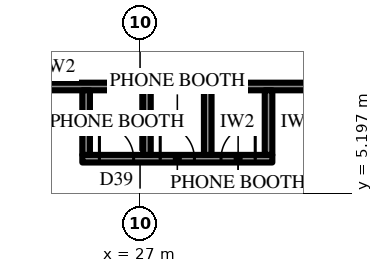
"""IFC4 building model, lengths in metres.
Left out: names, types, materials, properties, quantities, classifications, styles, units other than length and angle.
Written with IfcOpenShell. Run it as: python <this file> out.ifc"""

import sys

from ifc_helpers import new_model, si_unit, direction, frame, frame_2d, origin, place, context, subcontext, project, spatial, rectangle, extrude, element, fill, save


model = new_model("IFC4")
c1 = context("Model", 3, precision=1e-05, world=origin(), true_north=direction((0.0, 1.0)))
c2 = subcontext(c1, "Body", "Model", "MODEL_VIEW")
j1 = project(units=[si_unit("LENGTHUNIT", "METRE"), si_unit("PLANEANGLEUNIT", "RADIAN")], contexts=[c1])
p1 = place(None, origin())
s1 = spatial("IfcSite", under=j1, at=p1, CompositionType="ELEMENT")
p2 = place(p1, origin())
s2 = spatial("IfcBuilding", under=s1, at=p2, CompositionType="ELEMENT")
p3 = place(p2, frame((0.0, 0.0, 90.7)))
s3 = spatial("IfcBuildingStorey", under=s2, at=p3, CompositionType="ELEMENT", Elevation=90.7)
p4 = place(p3, frame((21.1, 8.0, 0.0), z_axis=(0.0, 0.0, 1.0), x_axis=(1.0, 0.0, 0.0)))
e1 = element("IfcWall", 1, at=p4, inside=s3, PredefinedType="PARTITIONING", context=c2, shape_type="SweptSolid", body=[
    extrude(rectangle(XDim=12.511, YDim=0.2, at=frame_2d((6.255, 0.0))), origin(), (0.0, 0.0, 1.0), 4.0),
])
p5 = place(p4, frame((0.751, 0.0, 0.0)))
e2 = element("IfcOpeningElement", 2, at=p5, cuts=e1, PredefinedType="OPENING", context=c2, shape_type="SweptSolid", body=[
    extrude(rectangle(XDim=1.0, YDim=2.2, at=frame_2d((0.5, 1.1))), frame((0.0, 0.11, 0.0), z_axis=(0.0, -1.0, 0.0), x_axis=(1.0, 0.0, 0.0)), (0.0, 0.0, 1.0), 0.22),
])
p6 = place(p3, frame((25.481, 6.1, 0.0), z_axis=(0.0, 0.0, 1.0), x_axis=(1.0, 0.0, 0.0)))
e3 = element("IfcWall", 3, at=p6, inside=s3, PredefinedType="PARTITIONING", context=c2, shape_type="SweptSolid", body=[
    extrude(rectangle(XDim=5.0, YDim=0.2, at=frame_2d((2.5, 0.0))), origin(), (0.0, 0.0, 1.0), 4.0),
])
p7 = place(p6, frame((0.45, 0.0, 0.0)))
e4 = element("IfcOpeningElement", 4, at=p7, cuts=e3, PredefinedType="OPENING", context=c2, shape_type="SweptSolid", body=[
    extrude(rectangle(XDim=0.9, YDim=2.2, at=frame_2d((0.45, 1.1))), frame((0.0, 0.11, 0.0), z_axis=(0.0, -1.0, 0.0), x_axis=(1.0, 0.0, 0.0)), (0.0, 0.0, 1.0), 0.22),
])
p8 = place(p6, frame((2.05, 0.0, 0.0)))
e5 = element("IfcOpeningElement", 5, at=p8, cuts=e3, PredefinedType="OPENING", context=c2, shape_type="SweptSolid", body=[
    extrude(rectangle(XDim=0.9, YDim=2.2, at=frame_2d((0.45, 1.1))), frame((0.0, 0.11, 0.0), z_axis=(0.0, -1.0, 0.0), x_axis=(1.0, 0.0, 0.0)), (0.0, 0.0, 1.0), 0.22),
])
p9 = place(p6, frame((3.65, 0.0, 0.0)))
e6 = element("IfcOpeningElement", 6, at=p9, cuts=e3, PredefinedType="OPENING", context=c2, shape_type="SweptSolid", body=[
    extrude(rectangle(XDim=0.9, YDim=2.2, at=frame_2d((0.45, 1.1))), frame((0.0, 0.11, 0.0), z_axis=(0.0, -1.0, 0.0), x_axis=(1.0, 0.0, 0.0)), (0.0, 0.0, 1.0), 0.22),
])
for number, where, z_axis, x_axis in (
    (7, (25.581, 7.9, 0.0), (0.0, 0.0, 1.0), (0.0, -1.0, 0.0)),
    (8, (27.181, 7.9, 0.0), (0.0, 0.0, 1.0), (0.0, -1.0, 0.0)),
    (9, (28.781, 7.9, 0.0), (0.0, 0.0, 1.0), (0.0, -1.0, 0.0)),
    (10, (30.381, 7.9, 0.0), (0.0, 0.0, 1.0), (0.0, -1.0, 0.0)),
):
    element("IfcWall", number, at=place(p3, frame(where, z_axis=z_axis, x_axis=x_axis)), inside=s3, PredefinedType="PARTITIONING", context=c2, shape_type="SweptSolid", body=[
        extrude(rectangle(XDim=1.7, YDim=0.2, at=frame_2d((0.85, 0.0))), origin(), (0.0, 0.0, 1.0), 4.0),
    ])
p10 = place(p7, origin())
e11 = element("IfcDoor", 11, at=p10, inside=s3, OperationType="SINGLE_SWING_RIGHT", PredefinedType="DOOR", context=c2, shape_type="SweptSolid", body=[
    extrude(rectangle(XDim=0.9, YDim=2.2, at=frame_2d((0.45, 1.1))), frame((0.0, 0.025, 0.0), z_axis=(0.0, -1.0, 0.0), x_axis=(1.0, 0.0, 0.0)), (0.0, 0.0, 1.0), 0.05),
])
fill(e4, e11)
p11 = place(p8, origin())
e12 = element("IfcDoor", 12, at=p11, inside=s3, OperationType="SINGLE_SWING_RIGHT", PredefinedType="DOOR", context=c2, shape_type="SweptSolid", body=[
    extrude(rectangle(XDim=0.9, YDim=2.2, at=frame_2d((0.45, 1.1))), frame((0.0, 0.025, 0.0), z_axis=(0.0, -1.0, 0.0), x_axis=(1.0, 0.0, 0.0)), (0.0, 0.0, 1.0), 0.05),
])
fill(e5, e12)
p12 = place(p9, origin())
e13 = element("IfcDoor", 13, at=p12, inside=s3, OperationType="SINGLE_SWING_LEFT", PredefinedType="DOOR", context=c2, shape_type="SweptSolid", body=[
    extrude(rectangle(XDim=0.9, YDim=2.2, at=frame_2d((0.45, 1.1))), frame((0.0, 0.025, 0.0), z_axis=(0.0, -1.0, 0.0), x_axis=(1.0, 0.0, 0.0)), (0.0, 0.0, 1.0), 0.05),
])
fill(e6, e13)
save(model, sys.argv[1])
